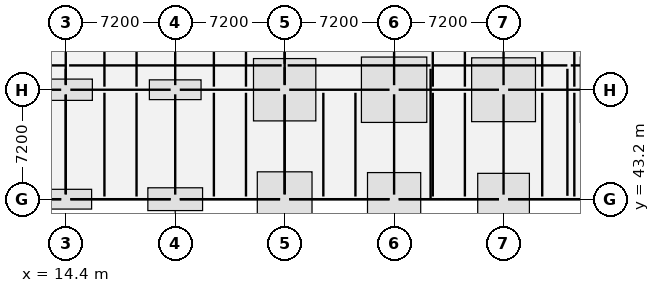
"""IFC4 building model, lengths in metres.
Left out: names, types, materials, properties, quantities, classifications, styles, units other than length and angle.
Written with IfcOpenShell. Run it as: python <this file> out.ifc"""

import sys

from ifc_helpers import new_model, si_unit, direction, frame, frame_2d, origin, origin_2d, place, context, subcontext, project, spatial, rectangle, extrude, element, fill, save


model = new_model("IFC4")
c1 = context("Model", 3, precision=1e-05, world=origin(), true_north=direction((0.0, 1.0)))
c2 = subcontext(c1, "Body", "Model", "MODEL_VIEW")
j1 = project(units=[si_unit("LENGTHUNIT", "METRE"), si_unit("PLANEANGLEUNIT", "RADIAN")], contexts=[c1])
p1 = place(None, origin())
s1 = spatial("IfcSite", under=j1, at=p1, CompositionType="ELEMENT")
p2 = place(p1, origin())
s2 = spatial("IfcBuilding", under=s1, at=p2, CompositionType="ELEMENT")
p3 = place(p2, origin())
s3 = spatial("IfcBuildingStorey", under=s2, at=p3, CompositionType="ELEMENT", Elevation=0.0)
for number, where, z_axis, x_axis in (
    (1, (14.4, 43.2, 0.0), (0.0, 0.0, 1.0), (1.0, 0.0, 0.0)),
    (2, (14.4, 50.4, 0.0), (0.0, 0.0, 1.0), (1.0, 0.0, 0.0)),
    (3, (21.6, 43.2, 0.0), (0.0, 0.0, 1.0), (1.0, 0.0, 0.0)),
    (4, (21.6, 50.4, 0.0), (0.0, 0.0, 1.0), (1.0, 0.0, 0.0)),
    (5, (28.8, 43.2, 0.0), (0.0, 0.0, 1.0), (1.0, 0.0, 0.0)),
    (6, (28.8, 50.4, 0.0), (0.0, 0.0, 1.0), (1.0, 0.0, 0.0)),
    (7, (36.0, 43.2, 0.0), (0.0, 0.0, 1.0), (1.0, 0.0, 0.0)),
    (8, (36.0, 50.4, 0.0), (0.0, 0.0, 1.0), (1.0, 0.0, 0.0)),
    (9, (43.2, 43.2, 0.0), (0.0, 0.0, 1.0), (1.0, 0.0, 0.0)),
    (10, (43.2, 50.4, 0.0), (0.0, 0.0, 1.0), (1.0, 0.0, 0.0)),
):
    element("IfcColumn", number, at=place(p3, frame(where, z_axis=z_axis, x_axis=x_axis)), inside=s3, PredefinedType="COLUMN", context=c2, shape_type="SweptSolid", body=[
        extrude(rectangle(XDim=0.6, YDim=0.6, at=origin_2d()), origin(), (0.0, 0.0, 1.0), 5.4),
    ])
p4 = place(p3, frame((50.1, 43.2, 0.0), z_axis=(0.0, 0.0, 1.0), x_axis=(-1.0, 0.0, 0.0)))
e11 = element("IfcWall", 11, at=p4, inside=s3, PredefinedType="ELEMENTEDWALL", context=c2, shape_type="SweptSolid", body=[
    extrude(rectangle(XDim=6.6, YDim=0.32, at=frame_2d((3.3, 0.0))), origin(), (0.0, 0.0, 1.0), 4.49),
])
p5 = place(p3, frame((39.8, 43.2, 0.0), z_axis=(0.0, 0.0, 1.0), x_axis=(-1.0, 0.0, 0.0)))
e12 = element("IfcWall", 12, at=p5, inside=s3, PredefinedType="SOLIDWALL", context=c2, shape_type="SweptSolid", body=[
    extrude(rectangle(XDim=0.4, YDim=0.36, at=frame_2d((0.2, 0.0))), origin(), (0.0, 0.0, 1.0), 4.49),
])
p6 = place(p3, frame((35.7, 43.2, 0.0), z_axis=(0.0, 0.0, 1.0), x_axis=(-1.0, 0.0, 0.0)))
e13 = element("IfcWall", 13, at=p6, inside=s3, PredefinedType="ELEMENTEDWALL", context=c2, shape_type="SweptSolid", body=[
    extrude(rectangle(XDim=6.6, YDim=0.32, at=frame_2d((3.3, 0.0))), origin(), (0.0, 0.0, 1.0), 4.49),
])
p7 = place(p6, frame((2.625, 0.0, 0.85)))
e14 = element("IfcOpeningElement", 14, at=p7, cuts=e13, PredefinedType="OPENING", context=c2, shape_type="SweptSolid", body=[
    extrude(rectangle(XDim=1.35, YDim=2.0, at=frame_2d((0.675, 1.0))), frame((0.0, 0.172, 0.0), z_axis=(0.0, -1.0, 0.0), x_axis=(1.0, 0.0, 0.0)), (0.0, 0.0, 1.0), 0.344),
])
p8 = place(p3, frame((25.4, 43.2, 0.0), z_axis=(0.0, 0.0, 1.0), x_axis=(-1.0, 0.0, 0.0)))
e15 = element("IfcWall", 15, at=p8, inside=s3, PredefinedType="SOLIDWALL", context=c2, shape_type="SweptSolid", body=[
    extrude(rectangle(XDim=0.4, YDim=0.36, at=frame_2d((0.2, 0.0))), origin(), (0.0, 0.0, 1.0), 4.5),
])
p9 = place(p3, frame((21.3, 43.2, 0.0), z_axis=(0.0, 0.0, 1.0), x_axis=(-1.0, 0.0, 0.0)))
e16 = element("IfcWall", 16, at=p9, inside=s3, PredefinedType="ELEMENTEDWALL", context=c2, shape_type="SweptSolid", body=[
    extrude(rectangle(XDim=6.6, YDim=0.32, at=frame_2d((3.3, 0.0))), origin(), (0.0, 0.0, 1.0), 4.5),
])
p10 = place(p9, frame((2.75, 0.0, 0.85)))
e17 = element("IfcOpeningElement", 17, at=p10, cuts=e16, PredefinedType="OPENING", context=c2, shape_type="SweptSolid", body=[
    extrude(rectangle(XDim=1.1, YDim=1.75, at=frame_2d((0.55, 0.875))), frame((0.0, 0.172, 0.0), z_axis=(0.0, -1.0, 0.0), x_axis=(1.0, 0.0, 0.0)), (0.0, 0.0, 1.0), 0.344),
])
p11 = place(p3, frame((28.8, 52.1, 0.0), z_axis=(0.0, 0.0, 1.0), x_axis=(0.0, 1.0, 0.0)))
e18 = element("IfcWall", 18, at=p11, inside=s3, PredefinedType="PARTITIONING", context=c2, shape_type="SweptSolid", body=[
    extrude(rectangle(XDim=2.2, YDim=0.14, at=frame_2d((1.1, 0.0))), origin(), (0.0, 0.0, 1.0), 4.488),
])
p12 = place(p11, frame((0.25, 0.0, 0.0)))
e19 = element("IfcOpeningElement", 19, at=p12, cuts=e18, PredefinedType="OPENING", context=c2, shape_type="SweptSolid", body=[
    extrude(rectangle(XDim=1.65, YDim=2.2, at=frame_2d((0.825, 1.1))), frame((0.0, 0.082, 0.0), z_axis=(0.0, -1.0, 0.0), x_axis=(1.0, 0.0, 0.0)), (0.0, 0.0, 1.0), 0.164),
])
p13 = place(p3, frame((0.22, 52.0, 0.0), z_axis=(0.0, 0.0, 1.0), x_axis=(1.0, 0.0, 0.0)))
e20 = element("IfcWall", 20, at=p13, inside=s3, PredefinedType="PARTITIONING", context=c2, shape_type="SweptSolid", body=[
    extrude(rectangle(XDim=14.18, YDim=0.12, at=frame_2d((7.09, 0.0))), origin(), (0.0, 0.0, 1.0), 4.488),
])
p14 = place(p13, frame((7.59, 0.0, 0.0)))
e21 = element("IfcOpeningElement", 21, at=p14, cuts=e20, PredefinedType="OPENING", context=c2, shape_type="SweptSolid", body=[
    extrude(rectangle(XDim=1.0, YDim=2.15, at=frame_2d((0.5, 1.075))), frame((0.0, 0.072, 0.0), z_axis=(0.0, -1.0, 0.0), x_axis=(1.0, 0.0, 0.0)), (0.0, 0.0, 1.0), 0.144),
])
p15 = place(p3, frame((14.4, 43.54, 0.0), z_axis=(0.0, 0.0, 1.0), x_axis=(0.0, 1.0, 0.0)))
e22 = element("IfcWall", 22, at=p15, inside=s3, PredefinedType="PARTITIONING", context=c2, shape_type="SweptSolid", body=[
    extrude(rectangle(XDim=6.52, YDim=0.12, at=frame_2d((3.26, 0.0))), origin(), (0.0, 0.0, 1.0), 4.548),
])
p16 = place(p3, frame((14.4, 50.74, 0.0), z_axis=(0.0, 0.0, 1.0), x_axis=(0.0, 1.0, 0.0)))
e23 = element("IfcWall", 23, at=p16, inside=s3, PredefinedType="PARTITIONING", context=c2, shape_type="SweptSolid", body=[
    extrude(rectangle(XDim=1.04, YDim=0.12, at=frame_2d((0.52, 0.0))), origin(), (0.0, 0.0, 1.0), 4.498),
])
p17 = place(p3, frame((14.62, 52.0, 0.0), z_axis=(0.0, 0.0, 1.0), x_axis=(1.0, 0.0, 0.0)))
e24 = element("IfcWall", 24, at=p17, inside=s3, PredefinedType="PARTITIONING", context=c2, shape_type="SweptSolid", body=[
    extrude(rectangle(XDim=13.984, YDim=0.1, at=frame_2d((6.992, 0.0))), origin(), (0.0, 0.0, 1.0), 4.498),
])
p18 = place(p17, frame((5.492, 0.0, 0.0)))
e25 = element("IfcOpeningElement", 25, at=p18, cuts=e24, PredefinedType="OPENING", context=c2, shape_type="SweptSolid", body=[
    extrude(rectangle(XDim=1.0, YDim=2.15, at=frame_2d((0.5, 1.075))), frame((0.0, 0.062, 0.0), z_axis=(0.0, -1.0, 0.0), x_axis=(1.0, 0.0, 0.0)), (0.0, 0.0, 1.0), 0.124),
])
p19 = place(p3, frame((28.8, 43.54, 0.0), z_axis=(0.0, 0.0, 1.0), x_axis=(0.0, 1.0, 0.0)))
e26 = element("IfcWall", 26, at=p19, inside=s3, PredefinedType="PARTITIONING", context=c2, shape_type="SweptSolid", body=[
    extrude(rectangle(XDim=6.52, YDim=0.1, at=frame_2d((3.26, 0.0))), origin(), (0.0, 0.0, 1.0), 4.538),
])
p20 = place(p3, frame((28.8, 50.74, 0.0), z_axis=(0.0, 0.0, 1.0), x_axis=(0.0, 1.0, 0.0)))
e27 = element("IfcWall", 27, at=p20, inside=s3, PredefinedType="PARTITIONING", context=c2, shape_type="SweptSolid", body=[
    extrude(rectangle(XDim=1.14, YDim=0.1, at=frame_2d((0.57, 0.0))), origin(), (0.0, 0.0, 1.0), 4.488),
])
p21 = place(p3, frame((28.996, 52.0, 0.0), z_axis=(0.0, 0.0, 1.0), x_axis=(1.0, 0.0, 0.0)))
e28 = element("IfcWall", 28, at=p21, inside=s3, PredefinedType="PLUMBINGWALL", context=c2, shape_type="SweptSolid", body=[
    extrude(rectangle(XDim=9.404, YDim=0.18, at=frame_2d((4.702, 0.0))), origin(), (0.0, 0.0, 1.0), 4.488),
])
p22 = place(p21, frame((4.202, 0.0, 0.0)))
e29 = element("IfcOpeningElement", 29, at=p22, cuts=e28, PredefinedType="OPENING", context=c2, shape_type="SweptSolid", body=[
    extrude(rectangle(XDim=1.0, YDim=2.15, at=frame_2d((0.5, 1.075))), frame((0.0, 0.102, 0.0), z_axis=(0.0, -1.0, 0.0), x_axis=(1.0, 0.0, 0.0)), (0.0, 0.0, 1.0), 0.204),
])
p23 = place(p3, frame((38.4, 43.2, 0.0), z_axis=(0.0, 0.0, 1.0), x_axis=(0.0, 1.0, 0.0)))
e30 = element("IfcWall", 30, at=p23, inside=s3, PredefinedType="PLUMBINGWALL", context=c2, shape_type="SweptSolid", body=[
    extrude(rectangle(XDim=8.58, YDim=0.18, at=frame_2d((4.29, 0.0))), origin(), (0.0, 0.0, 1.0), 4.388),
])
p24 = place(p3, frame((38.62, 52.0, 0.0), z_axis=(0.0, 0.0, 1.0), x_axis=(1.0, 0.0, 0.0)))
e31 = element("IfcWall", 31, at=p24, inside=s3, PredefinedType="PLUMBINGWALL", context=c2, shape_type="SweptSolid", body=[
    extrude(rectangle(XDim=8.78, YDim=0.18, at=frame_2d((4.39, 0.0))), origin(), (0.0, 0.0, 1.0), 4.488),
])
p25 = place(p24, frame((3.19, 0.0, 0.0)))
e32 = element("IfcOpeningElement", 32, at=p25, cuts=e31, PredefinedType="OPENING", context=c2, shape_type="SweptSolid", body=[
    extrude(rectangle(XDim=0.9, YDim=2.1, at=frame_2d((0.45, 1.05))), frame((0.0, 0.102, 0.0), z_axis=(0.0, -1.0, 0.0), x_axis=(1.0, 0.0, 0.0)), (0.0, 0.0, 1.0), 0.204),
])
p26 = place(p3, frame((47.4, 43.42, 0.0), z_axis=(0.0, 0.0, 1.0), x_axis=(0.0, 1.0, 0.0)))
e33 = element("IfcWall", 33, at=p26, inside=s3, PredefinedType="PLUMBINGWALL", context=c2, shape_type="SweptSolid", body=[
    extrude(rectangle(XDim=8.36, YDim=0.18, at=frame_2d((4.18, 0.0))), origin(), (0.0, 0.0, 1.0), 4.438),
])
p27 = place(p3, frame((47.62, 52.0, 0.0), z_axis=(0.0, 0.0, 1.0), x_axis=(1.0, 0.0, 0.0)))
e34 = element("IfcWall", 34, at=p27, inside=s3, PredefinedType="PARTITIONING", context=c2, shape_type="SweptSolid", body=[
    extrude(rectangle(XDim=8.86, YDim=0.1, at=frame_2d((4.43, 0.0))), origin(), (0.0, 0.0, 1.0), 4.488),
])
p28 = place(p27, frame((3.93, 0.0, 0.0)))
e35 = element("IfcOpeningElement", 35, at=p28, cuts=e34, PredefinedType="OPENING", context=c2, shape_type="SweptSolid", body=[
    extrude(rectangle(XDim=1.0, YDim=2.15, at=frame_2d((0.5, 1.075))), frame((0.0, 0.062, 0.0), z_axis=(0.0, -1.0, 0.0), x_axis=(1.0, 0.0, 0.0)), (0.0, 0.0, 1.0), 0.124),
])
p29 = place(p7, origin())
e36 = element("IfcWindow", 36, at=p29, inside=s3, PartitioningType="SINGLE_PANEL", PredefinedType="WINDOW", context=c2, shape_type="SweptSolid", body=[
    extrude(rectangle(XDim=1.35, YDim=2.0, at=frame_2d((0.675, 1.0))), frame((0.0, 0.03, 0.0), z_axis=(0.0, -1.0, 0.0), x_axis=(1.0, 0.0, 0.0)), (0.0, 0.0, 1.0), 0.06),
])
fill(e14, e36)
p30 = place(p10, origin())
e37 = element("IfcWindow", 37, at=p30, inside=s3, PartitioningType="SINGLE_PANEL", PredefinedType="WINDOW", context=c2, shape_type="SweptSolid", body=[
    extrude(rectangle(XDim=1.1, YDim=1.75, at=frame_2d((0.55, 0.875))), frame((0.0, 0.03, 0.0), z_axis=(0.0, -1.0, 0.0), x_axis=(1.0, 0.0, 0.0)), (0.0, 0.0, 1.0), 0.06),
])
fill(e17, e37)
p31 = place(p12, origin())
e38 = element("IfcDoor", 38, at=p31, inside=s3, OperationType="DOUBLE_SWING_LEFT", PredefinedType="DOOR", context=c2, shape_type="SweptSolid", body=[
    extrude(rectangle(XDim=1.65, YDim=2.2, at=frame_2d((0.825, 1.1))), frame((0.0, 0.025, 0.0), z_axis=(0.0, -1.0, 0.0), x_axis=(1.0, 0.0, 0.0)), (0.0, 0.0, 1.0), 0.05),
])
fill(e19, e38)
p32 = place(p18, origin())
e39 = element("IfcDoor", 39, at=p32, inside=s3, OperationType="SINGLE_SWING_RIGHT", PredefinedType="DOOR", context=c2, shape_type="SweptSolid", body=[
    extrude(rectangle(XDim=1.0, YDim=2.15, at=frame_2d((0.5, 1.075))), frame((0.0, 0.025, 0.0), z_axis=(0.0, -1.0, 0.0), x_axis=(1.0, 0.0, 0.0)), (0.0, 0.0, 1.0), 0.05),
])
fill(e25, e39)
p33 = place(p22, origin())
e40 = element("IfcDoor", 40, at=p33, inside=s3, OperationType="SINGLE_SWING_RIGHT", PredefinedType="DOOR", context=c2, shape_type="SweptSolid", body=[
    extrude(rectangle(XDim=1.0, YDim=2.15, at=frame_2d((0.5, 1.075))), frame((0.0, 0.025, 0.0), z_axis=(0.0, -1.0, 0.0), x_axis=(1.0, 0.0, 0.0)), (0.0, 0.0, 1.0), 0.05),
])
fill(e29, e40)
p34 = place(p25, origin())
e41 = element("IfcDoor", 41, at=p34, inside=s3, OperationType="SINGLE_SWING_LEFT", PredefinedType="DOOR", context=c2, shape_type="SweptSolid", body=[
    extrude(rectangle(XDim=0.9, YDim=2.1, at=frame_2d((0.45, 1.05))), frame((0.0, 0.025, 0.0), z_axis=(0.0, -1.0, 0.0), x_axis=(1.0, 0.0, 0.0)), (0.0, 0.0, 1.0), 0.05),
])
fill(e32, e41)
save(model, sys.argv[1])
